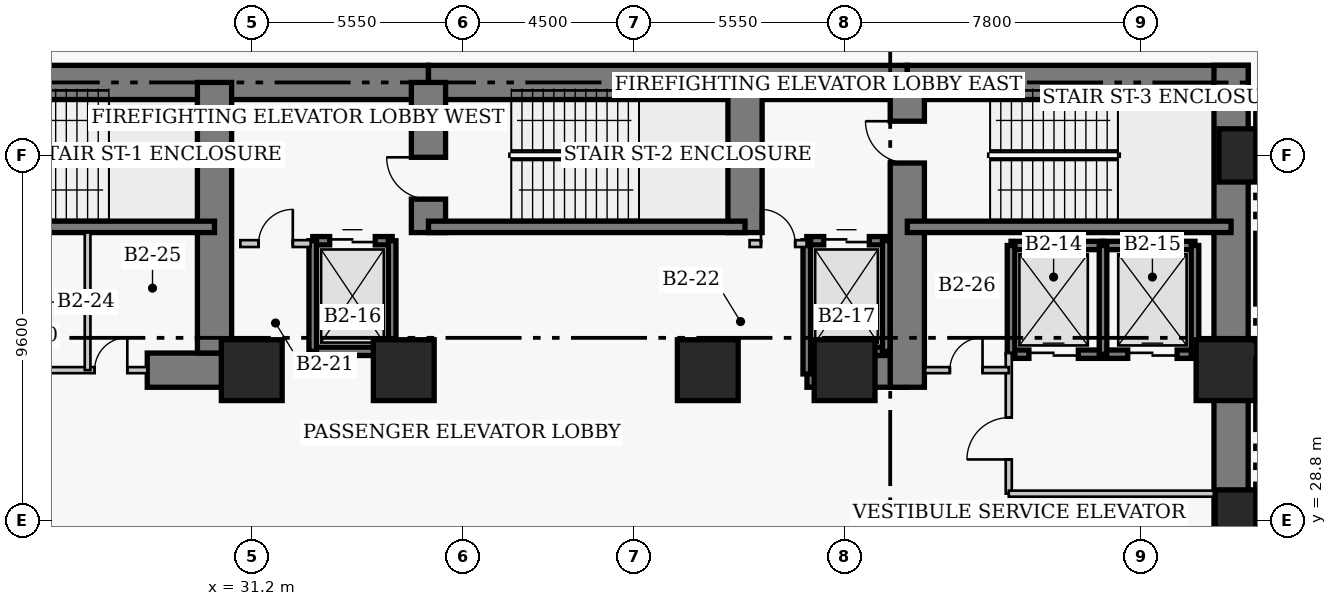
"""IFC4 building model, lengths in metres.
Left out: names, types, materials, properties, quantities, classifications, styles, units other than length and angle.
Written with IfcOpenShell. Run it as: python <this file> out.ifc"""

import sys

from ifc_helpers import new_model, si_unit, direction, frame, frame_2d, origin, origin_2d, place, context, subcontext, project, spatial, rectangle, extrude, element, fill, save


model = new_model("IFC4")
c1 = context("Model", 3, precision=1e-05, world=origin(), true_north=direction((0.0, 1.0)))
c2 = subcontext(c1, "Body", "Model", "MODEL_VIEW")
j1 = project(units=[si_unit("LENGTHUNIT", "METRE"), si_unit("PLANEANGLEUNIT", "RADIAN")], contexts=[c1])
p1 = place(None, origin())
s1 = spatial("IfcSite", under=j1, at=p1, CompositionType="ELEMENT")
p2 = place(p1, origin())
s2 = spatial("IfcBuilding", under=s1, at=p2, CompositionType="ELEMENT")
p3 = place(p2, frame((0.0, 0.0, -9.0)))
s3 = spatial("IfcBuildingStorey", under=s2, at=p3, CompositionType="ELEMENT", Elevation=-9.0)
p4 = place(p3, frame((21.45, 40.32, 0.0), z_axis=(0.0, 0.0, 1.0), x_axis=(1.0, 0.0, 0.0)))
e1 = element("IfcWall", 1, at=p4, inside=s3, PredefinedType="SHEAR", context=c2, shape_type="SweptSolid", body=[
    extrude(rectangle(XDim=14.4, YDim=0.9, at=frame_2d((7.2, 0.0))), origin(), (0.0, 0.0, 1.0), 4.5),
])
p5 = place(p3, frame((35.85, 40.32, 0.0), z_axis=(0.0, 0.0, 1.0), x_axis=(1.0, 0.0, 0.0)))
e2 = element("IfcWall", 2, at=p5, inside=s3, PredefinedType="SHEAR", context=c2, shape_type="SweptSolid", body=[
    extrude(rectangle(XDim=12.6, YDim=0.9, at=frame_2d((6.3, 0.0))), origin(), (0.0, 0.0, 1.0), 4.5),
])
p6 = place(p3, frame((48.45, 40.32, 0.0), z_axis=(0.0, 0.0, 1.0), x_axis=(1.0, 0.0, 0.0)))
e3 = element("IfcWall", 3, at=p6, inside=s3, PredefinedType="SHEAR", context=c2, shape_type="SweptSolid", body=[
    extrude(rectangle(XDim=8.97, YDim=0.9, at=frame_2d((4.485, 0.0))), origin(), (0.0, 0.0, 1.0), 4.5),
])
p7 = place(p3, frame((56.97, 27.05, 0.0), z_axis=(0.0, 0.0, 1.0), x_axis=(0.0, 1.0, 0.0)))
e4 = element("IfcWall", 4, at=p7, inside=s3, PredefinedType="SHEAR", context=c2, shape_type="SweptSolid", body=[
    extrude(rectangle(XDim=13.72, YDim=0.9, at=frame_2d((6.86, 0.0))), origin(), (0.0, 0.0, 1.0), 4.5),
])
p8 = place(p3, frame((28.45, 32.75, 0.0), z_axis=(0.0, 0.0, 1.0), x_axis=(1.0, 0.0, 0.0)))
e5 = element("IfcWall", 5, at=p8, inside=s3, PredefinedType="SHEAR", context=c2, shape_type="SweptSolid", body=[
    extrude(rectangle(XDim=2.4, YDim=0.9, at=frame_2d((1.2, 0.0))), origin(), (0.0, 0.0, 1.0), 4.5),
])
p9 = place(p3, frame((45.81, 32.75, 0.0), z_axis=(0.0, 0.0, 1.0), x_axis=(1.0, 0.0, 0.0)))
e6 = element("IfcWall", 6, at=p9, inside=s3, PredefinedType="SHEAR", context=c2, shape_type="SweptSolid", body=[
    extrude(rectangle(XDim=2.64, YDim=0.9, at=frame_2d((1.32, 0.0))), origin(), (0.0, 0.0, 1.0), 4.5),
])
p10 = place(p3, frame((30.22, 33.2, 0.0), z_axis=(0.0, 0.0, 1.0), x_axis=(0.0, 1.0, 0.0)))
e7 = element("IfcWall", 7, at=p10, inside=s3, PredefinedType="SHEAR", context=c2, shape_type="SweptSolid", body=[
    extrude(rectangle(XDim=7.12, YDim=0.9, at=frame_2d((3.56, 0.0))), origin(), (0.0, 0.0, 1.0), 4.5),
])
p11 = place(p3, frame((35.85, 36.37, 0.0), z_axis=(0.0, 0.0, 1.0), x_axis=(0.0, 1.0, 0.0)))
e8 = element("IfcWall", 8, at=p11, inside=s3, PredefinedType="SHEAR", context=c2, shape_type="SweptSolid", body=[
    extrude(rectangle(XDim=3.95, YDim=0.9, at=frame_2d((1.975, 0.0))), origin(), (0.0, 0.0, 1.0), 4.5),
])
p12 = place(p11, frame((0.88, 0.0, 0.0)))
e9 = element("IfcOpeningElement", 9, at=p12, cuts=e8, PredefinedType="OPENING", context=c2, shape_type="SweptSolid", body=[
    extrude(rectangle(XDim=1.1, YDim=2.15, at=frame_2d((0.55, 1.075))), frame((0.0, 0.46, 0.0), z_axis=(0.0, -1.0, 0.0), x_axis=(1.0, 0.0, 0.0)), (0.0, 0.0, 1.0), 0.92),
])
p13 = place(p3, frame((44.18, 36.37, 0.0), z_axis=(0.0, 0.0, 1.0), x_axis=(0.0, 1.0, 0.0)))
e10 = element("IfcWall", 10, at=p13, inside=s3, PredefinedType="SHEAR", context=c2, shape_type="SweptSolid", body=[
    extrude(rectangle(XDim=3.95, YDim=0.9, at=frame_2d((1.975, 0.0))), origin(), (0.0, 0.0, 1.0), 4.5),
])
p14 = place(p3, frame((48.45, 32.3, 0.0), z_axis=(0.0, 0.0, 1.0), x_axis=(0.0, 1.0, 0.0)))
e11 = element("IfcWall", 11, at=p14, inside=s3, PredefinedType="SHEAR", context=c2, shape_type="SweptSolid", body=[
    extrude(rectangle(XDim=8.02, YDim=0.9, at=frame_2d((4.01, 0.0))), origin(), (0.0, 0.0, 1.0), 4.5),
])
p15 = place(p14, frame((5.9, 0.0, 0.0)))
e12 = element("IfcOpeningElement", 12, at=p15, cuts=e11, PredefinedType="OPENING", context=c2, shape_type="SweptSolid", body=[
    extrude(rectangle(XDim=1.1, YDim=2.15, at=frame_2d((0.55, 1.075))), frame((0.0, 0.46, 0.0), z_axis=(0.0, -1.0, 0.0), x_axis=(1.0, 0.0, 0.0)), (0.0, 0.0, 1.0), 0.92),
])
p16 = place(p3, frame((21.9, 36.52, 0.0), z_axis=(0.0, 0.0, 1.0), x_axis=(1.0, 0.0, 0.0)))
e13 = element("IfcWall", 13, at=p16, inside=s3, PredefinedType="SHEAR", context=c2, shape_type="SweptSolid", body=[
    extrude(rectangle(XDim=8.32, YDim=0.3, at=frame_2d((4.16, 0.0))), origin(), (0.0, 0.0, 1.0), 4.5),
])
p17 = place(p16, frame((0.9, 0.0, 0.0)))
e14 = element("IfcOpeningElement", 14, at=p17, cuts=e13, PredefinedType="OPENING", context=c2, shape_type="SweptSolid", body=[
    extrude(rectangle(XDim=1.1, YDim=2.15, at=frame_2d((0.55, 1.075))), frame((0.0, 0.16, 0.0), z_axis=(0.0, -1.0, 0.0), x_axis=(1.0, 0.0, 0.0)), (0.0, 0.0, 1.0), 0.32),
])
p18 = place(p3, frame((35.85, 36.52, 0.0), z_axis=(0.0, 0.0, 1.0), x_axis=(1.0, 0.0, 0.0)))
e15 = element("IfcWall", 15, at=p18, inside=s3, PredefinedType="SHEAR", context=c2, shape_type="SweptSolid", body=[
    extrude(rectangle(XDim=8.33, YDim=0.3, at=frame_2d((4.165, 0.0))), origin(), (0.0, 0.0, 1.0), 4.5),
])
p19 = place(p3, frame((48.45, 36.52, 0.0), z_axis=(0.0, 0.0, 1.0), x_axis=(1.0, 0.0, 0.0)))
e16 = element("IfcWall", 16, at=p19, inside=s3, PredefinedType="SHEAR", context=c2, shape_type="SweptSolid", body=[
    extrude(rectangle(XDim=8.52, YDim=0.3, at=frame_2d((4.26, 0.0))), origin(), (0.0, 0.0, 1.0), 4.5),
])
p20 = place(p3, frame((57.35, 28.8, 0.0), z_axis=(0.0, 0.0, 1.0), x_axis=(1.0, 0.0, 0.0)))
e17 = element("IfcColumn", 17, at=p20, inside=s3, PredefinedType="COLUMN", context=c2, shape_type="SweptSolid", body=[
    extrude(rectangle(XDim=1.6, YDim=1.6, at=origin_2d()), origin(), (0.0, 0.0, 1.0), 4.5),
])
p21 = place(p3, frame((57.35, 38.4, 0.0), z_axis=(0.0, 0.0, 1.0), x_axis=(1.0, 0.0, 0.0)))
e18 = element("IfcColumn", 18, at=p21, inside=s3, PredefinedType="COLUMN", context=c2, shape_type="SweptSolid", body=[
    extrude(rectangle(XDim=1.4, YDim=1.4, at=origin_2d()), origin(), (0.0, 0.0, 1.0), 4.5),
])
for number, where, z_axis, x_axis in (
    (19, (31.2, 32.75, 0.0), (0.0, 0.0, 1.0), (1.0, 0.0, 0.0)),
    (20, (35.2, 32.75, 0.0), (0.0, 0.0, 1.0), (1.0, 0.0, 0.0)),
    (21, (43.2, 32.75, 0.0), (0.0, 0.0, 1.0), (1.0, 0.0, 0.0)),
    (22, (46.8, 32.75, 0.0), (0.0, 0.0, 1.0), (1.0, 0.0, 0.0)),
    (23, (56.85, 32.75, 0.0), (0.0, 0.0, 1.0), (1.0, 0.0, 0.0)),
):
    element("IfcColumn", number, at=place(p3, frame(where, z_axis=z_axis, x_axis=x_axis)), inside=s3, PredefinedType="COLUMN", context=c2, shape_type="SweptSolid", body=[
        extrude(rectangle(XDim=1.6, YDim=1.6, at=origin_2d()), origin(), (0.0, 0.0, 1.0), 4.5),
    ])
p22 = place(p3, frame((51.18, 36.03, 0.0), z_axis=(0.0, 0.0, 1.0), x_axis=(1.0, 0.0, 0.0)))
e24 = element("IfcWall", 24, at=p22, inside=s3, PredefinedType="SHEAR", context=c2, shape_type="SweptSolid", body=[
    extrude(rectangle(XDim=2.42, YDim=0.22, at=frame_2d((1.21, 0.0))), origin(), (0.0, 0.0, 1.0), 4.5),
])
p23 = place(p3, frame((51.18, 33.17, 0.0), z_axis=(0.0, 0.0, 1.0), x_axis=(1.0, 0.0, 0.0)))
e25 = element("IfcWall", 25, at=p23, inside=s3, PredefinedType="SHEAR", context=c2, shape_type="SweptSolid", body=[
    extrude(rectangle(XDim=2.42, YDim=0.22, at=frame_2d((1.21, 0.0))), origin(), (0.0, 0.0, 1.0), 4.5),
])
p24 = place(p23, frame((0.47, 0.0, 0.0)))
e26 = element("IfcOpeningElement", 26, at=p24, cuts=e25, PredefinedType="OPENING", context=c2, shape_type="SweptSolid", body=[
    extrude(rectangle(XDim=1.3, YDim=2.15, at=frame_2d((0.65, 1.075))), frame((0.0, 0.12, 0.0), z_axis=(0.0, -1.0, 0.0), x_axis=(1.0, 0.0, 0.0)), (0.0, 0.0, 1.0), 0.24),
])
p25 = place(p3, frame((51.18, 33.17, 0.0), z_axis=(0.0, 0.0, 1.0), x_axis=(0.0, 1.0, 0.0)))
e27 = element("IfcWall", 27, at=p25, inside=s3, PredefinedType="SHEAR", context=c2, shape_type="SweptSolid", body=[
    extrude(rectangle(XDim=2.86, YDim=0.2, at=frame_2d((1.43, 0.0))), origin(), (0.0, 0.0, 1.0), 4.5),
])
p26 = place(p3, frame((53.6, 36.03, 0.0), z_axis=(0.0, 0.0, 1.0), x_axis=(1.0, 0.0, 0.0)))
e28 = element("IfcWall", 28, at=p26, inside=s3, PredefinedType="SHEAR", context=c2, shape_type="SweptSolid", body=[
    extrude(rectangle(XDim=2.42, YDim=0.22, at=frame_2d((1.21, 0.0))), origin(), (0.0, 0.0, 1.0), 4.5),
])
p27 = place(p3, frame((53.6, 33.17, 0.0), z_axis=(0.0, 0.0, 1.0), x_axis=(1.0, 0.0, 0.0)))
e29 = element("IfcWall", 29, at=p27, inside=s3, PredefinedType="SHEAR", context=c2, shape_type="SweptSolid", body=[
    extrude(rectangle(XDim=2.42, YDim=0.22, at=frame_2d((1.21, 0.0))), origin(), (0.0, 0.0, 1.0), 4.5),
])
p28 = place(p27, frame((0.65, 0.0, 0.0)))
e30 = element("IfcOpeningElement", 30, at=p28, cuts=e29, PredefinedType="OPENING", context=c2, shape_type="SweptSolid", body=[
    extrude(rectangle(XDim=1.3, YDim=2.15, at=frame_2d((0.65, 1.075))), frame((0.0, 0.12, 0.0), z_axis=(0.0, -1.0, 0.0), x_axis=(1.0, 0.0, 0.0)), (0.0, 0.0, 1.0), 0.24),
])
for number, where, z_axis, x_axis in (
    (31, (53.6, 33.17, 0.0), (0.0, 0.0, 1.0), (0.0, 1.0, 0.0)),
    (32, (56.02, 33.17, 0.0), (0.0, 0.0, 1.0), (0.0, 1.0, 0.0)),
):
    element("IfcWall", number, at=place(p3, frame(where, z_axis=z_axis, x_axis=x_axis)), inside=s3, PredefinedType="SHEAR", context=c2, shape_type="SweptSolid", body=[
        extrude(rectangle(XDim=2.86, YDim=0.2, at=frame_2d((1.43, 0.0))), origin(), (0.0, 0.0, 1.0), 4.5),
    ])
p29 = place(p3, frame((32.805, 36.155, 0.0), z_axis=(0.0, 0.0, 1.0), x_axis=(1.0, 0.0, 0.0)))
e33 = element("IfcWall", 33, at=p29, inside=s3, PredefinedType="SHEAR", context=c2, shape_type="SweptSolid", body=[
    extrude(rectangle(XDim=2.09, YDim=0.22, at=frame_2d((1.045, 0.0))), origin(), (0.0, 0.0, 1.0), 4.5),
])
p30 = place(p29, frame((0.445, 0.0, 0.0)))
e34 = element("IfcOpeningElement", 34, at=p30, cuts=e33, PredefinedType="OPENING", context=c2, shape_type="SweptSolid", body=[
    extrude(rectangle(XDim=1.2, YDim=2.15, at=frame_2d((0.6, 1.075))), frame((0.0, 0.12, 0.0), z_axis=(0.0, -1.0, 0.0), x_axis=(1.0, 0.0, 0.0)), (0.0, 0.0, 1.0), 0.24),
])
p31 = place(p3, frame((32.805, 33.245, 0.0), z_axis=(0.0, 0.0, 1.0), x_axis=(1.0, 0.0, 0.0)))
e35 = element("IfcWall", 35, at=p31, inside=s3, PredefinedType="SHEAR", context=c2, shape_type="SweptSolid", body=[
    extrude(rectangle(XDim=2.09, YDim=0.22, at=frame_2d((1.045, 0.0))), origin(), (0.0, 0.0, 1.0), 4.5),
])
for number, where, z_axis, x_axis in (
    (36, (32.805, 33.245, 0.0), (0.0, 0.0, 1.0), (0.0, 1.0, 0.0)),
    (37, (34.895, 33.245, 0.0), (0.0, 0.0, 1.0), (0.0, 1.0, 0.0)),
):
    element("IfcWall", number, at=place(p3, frame(where, z_axis=z_axis, x_axis=x_axis)), inside=s3, PredefinedType="SHEAR", context=c2, shape_type="SweptSolid", body=[
        extrude(rectangle(XDim=2.91, YDim=0.2, at=frame_2d((1.455, 0.0))), origin(), (0.0, 0.0, 1.0), 4.5),
    ])
p32 = place(p3, frame((45.805, 36.155, 0.0), z_axis=(0.0, 0.0, 1.0), x_axis=(1.0, 0.0, 0.0)))
e38 = element("IfcWall", 38, at=p32, inside=s3, PredefinedType="SHEAR", context=c2, shape_type="SweptSolid", body=[
    extrude(rectangle(XDim=2.09, YDim=0.22, at=frame_2d((1.045, 0.0))), origin(), (0.0, 0.0, 1.0), 4.5),
])
p33 = place(p32, frame((0.445, 0.0, 0.0)))
e39 = element("IfcOpeningElement", 39, at=p33, cuts=e38, PredefinedType="OPENING", context=c2, shape_type="SweptSolid", body=[
    extrude(rectangle(XDim=1.2, YDim=2.15, at=frame_2d((0.6, 1.075))), frame((0.0, 0.12, 0.0), z_axis=(0.0, -1.0, 0.0), x_axis=(1.0, 0.0, 0.0)), (0.0, 0.0, 1.0), 0.24),
])
p34 = place(p3, frame((45.805, 33.245, 0.0), z_axis=(0.0, 0.0, 1.0), x_axis=(1.0, 0.0, 0.0)))
e40 = element("IfcWall", 40, at=p34, inside=s3, PredefinedType="SHEAR", context=c2, shape_type="SweptSolid", body=[
    extrude(rectangle(XDim=2.09, YDim=0.22, at=frame_2d((1.045, 0.0))), origin(), (0.0, 0.0, 1.0), 4.5),
])
p35 = place(p3, frame((45.805, 32.65, 0.0), z_axis=(0.0, 0.0, 1.0), x_axis=(0.0, 1.0, 0.0)))
e41 = element("IfcWall", 41, at=p35, inside=s3, PredefinedType="SHEAR", context=c2, shape_type="SweptSolid", body=[
    extrude(rectangle(XDim=3.505, YDim=0.2, at=frame_2d((1.752, 0.0))), origin(), (0.0, 0.0, 1.0), 4.5),
])
p36 = place(p3, frame((47.895, 33.245, 0.0), z_axis=(0.0, 0.0, 1.0), x_axis=(0.0, 1.0, 0.0)))
e42 = element("IfcWall", 42, at=p36, inside=s3, PredefinedType="SHEAR", context=c2, shape_type="SweptSolid", body=[
    extrude(rectangle(XDim=2.91, YDim=0.2, at=frame_2d((1.455, 0.0))), origin(), (0.0, 0.0, 1.0), 4.5),
])
p37 = place(p3, frame((30.9, 36.08, 0.0), z_axis=(0.0, 0.0, 1.0), x_axis=(1.0, 0.0, 0.0)))
e43 = element("IfcWall", 43, at=p37, inside=s3, PredefinedType="PARTITIONING", context=c2, shape_type="SweptSolid", body=[
    extrude(rectangle(XDim=1.85, YDim=0.18, at=frame_2d((0.925, 0.0))), origin(), (0.0, 0.0, 1.0), 4.18),
])
p38 = place(p37, frame((0.48, 0.0, 0.0)))
e44 = element("IfcOpeningElement", 44, at=p38, cuts=e43, PredefinedType="OPENING", context=c2, shape_type="SweptSolid", body=[
    extrude(rectangle(XDim=0.9, YDim=2.15, at=frame_2d((0.45, 1.075))), frame((0.0, 0.1, 0.0), z_axis=(0.0, -1.0, 0.0), x_axis=(1.0, 0.0, 0.0)), (0.0, 0.0, 1.0), 0.2),
])
p39 = place(p3, frame((44.3, 36.08, 0.0), z_axis=(0.0, 0.0, 1.0), x_axis=(1.0, 0.0, 0.0)))
e45 = element("IfcWall", 45, at=p39, inside=s3, PredefinedType="PARTITIONING", context=c2, shape_type="SweptSolid", body=[
    extrude(rectangle(XDim=1.5, YDim=0.18, at=frame_2d((0.75, 0.0))), origin(), (0.0, 0.0, 1.0), 4.18),
])
p40 = place(p39, frame((0.3, 0.0, 0.0)))
e46 = element("IfcOpeningElement", 46, at=p40, cuts=e45, PredefinedType="OPENING", context=c2, shape_type="SweptSolid", body=[
    extrude(rectangle(XDim=0.9, YDim=2.15, at=frame_2d((0.45, 1.075))), frame((0.0, 0.1, 0.0), z_axis=(0.0, -1.0, 0.0), x_axis=(1.0, 0.0, 0.0)), (0.0, 0.0, 1.0), 0.2),
])
p41 = place(p3, frame((51.12, 29.5, 0.0), z_axis=(0.0, 0.0, 1.0), x_axis=(0.0, 1.0, 0.0)))
e47 = element("IfcWall", 47, at=p41, inside=s3, PredefinedType="PARTITIONING", context=c2, shape_type="SweptSolid", body=[
    extrude(rectangle(XDim=3.7, YDim=0.16, at=frame_2d((1.85, 0.0))), origin(), (0.0, 0.0, 1.0), 4.18),
])
p42 = place(p41, frame((0.9, 0.0, 0.0)))
e48 = element("IfcOpeningElement", 48, at=p42, cuts=e47, PredefinedType="OPENING", context=c2, shape_type="SweptSolid", body=[
    extrude(rectangle(XDim=1.1, YDim=2.15, at=frame_2d((0.55, 1.075))), frame((0.0, 0.09, 0.0), z_axis=(0.0, -1.0, 0.0), x_axis=(1.0, 0.0, 0.0)), (0.0, 0.0, 1.0), 0.18),
])
p43 = place(p3, frame((51.12, 29.5, 0.0), z_axis=(0.0, 0.0, 1.0), x_axis=(1.0, 0.0, 0.0)))
e49 = element("IfcWall", 49, at=p43, inside=s3, PredefinedType="PARTITIONING", context=c2, shape_type="SweptSolid", body=[
    extrude(rectangle(XDim=5.63, YDim=0.16, at=frame_2d((2.815, 0.0))), origin(), (0.0, 0.0, 1.0), 4.18),
])
p44 = place(p3, frame((24.48, 32.75, 0.0), z_axis=(0.0, 0.0, 1.0), x_axis=(1.0, 0.0, 0.0)))
e50 = element("IfcWall", 50, at=p44, inside=s3, PredefinedType="PARTITIONING", context=c2, shape_type="SweptSolid", body=[
    extrude(rectangle(XDim=3.97, YDim=0.16, at=frame_2d((1.985, 0.0))), origin(), (0.0, 0.0, 1.0), 4.18),
])
p45 = place(p44, frame((2.585, 0.0, 0.0)))
e51 = element("IfcOpeningElement", 51, at=p45, cuts=e50, PredefinedType="OPENING", context=c2, shape_type="SweptSolid", body=[
    extrude(rectangle(XDim=0.86, YDim=2.05, at=frame_2d((0.43, 1.025))), frame((0.0, 0.09, 0.0), z_axis=(0.0, -1.0, 0.0), x_axis=(1.0, 0.0, 0.0)), (0.0, 0.0, 1.0), 0.18),
])
p46 = place(p3, frame((48.92, 32.75, 0.0), z_axis=(0.0, 0.0, 1.0), x_axis=(1.0, 0.0, 0.0)))
e52 = element("IfcWall", 52, at=p46, inside=s3, PredefinedType="PARTITIONING", context=c2, shape_type="SweptSolid", body=[
    extrude(rectangle(XDim=2.2, YDim=0.16, at=frame_2d((1.1, 0.0))), origin(), (0.0, 0.0, 1.0), 4.18),
])
p47 = place(p46, frame((0.65, 0.0, 0.0)))
e53 = element("IfcOpeningElement", 53, at=p47, cuts=e52, PredefinedType="OPENING", context=c2, shape_type="SweptSolid", body=[
    extrude(rectangle(XDim=0.86, YDim=2.05, at=frame_2d((0.43, 1.025))), frame((0.0, 0.09, 0.0), z_axis=(0.0, -1.0, 0.0), x_axis=(1.0, 0.0, 0.0)), (0.0, 0.0, 1.0), 0.18),
])
p48 = place(p3, frame((26.88, 32.75, 0.0), z_axis=(0.0, 0.0, 1.0), x_axis=(0.0, 1.0, 0.0)))
e54 = element("IfcWall", 54, at=p48, inside=s3, PredefinedType="PARTITIONING", context=c2, shape_type="SweptSolid", body=[
    extrude(rectangle(XDim=3.62, YDim=0.15, at=frame_2d((1.81, 0.0))), origin(), (0.0, 0.0, 1.0), 4.18),
])
p49 = place(p24, origin())
e55 = element("IfcDoor", 55, at=p49, inside=s3, OperationType="DOUBLE_DOOR_SLIDING", PredefinedType="DOOR", context=c2, shape_type="SweptSolid", body=[
    extrude(rectangle(XDim=1.3, YDim=2.15, at=frame_2d((0.65, 1.075))), frame((0.0, 0.025, 0.0), z_axis=(0.0, -1.0, 0.0), x_axis=(1.0, 0.0, 0.0)), (0.0, 0.0, 1.0), 0.05),
])
fill(e26, e55)
p50 = place(p28, origin())
e56 = element("IfcDoor", 56, at=p50, inside=s3, OperationType="DOUBLE_DOOR_SLIDING", PredefinedType="DOOR", context=c2, shape_type="SweptSolid", body=[
    extrude(rectangle(XDim=1.3, YDim=2.15, at=frame_2d((0.65, 1.075))), frame((0.0, 0.025, 0.0), z_axis=(0.0, -1.0, 0.0), x_axis=(1.0, 0.0, 0.0)), (0.0, 0.0, 1.0), 0.05),
])
fill(e30, e56)
p51 = place(p30, origin())
e57 = element("IfcDoor", 57, at=p51, inside=s3, OperationType="DOUBLE_DOOR_SLIDING", PredefinedType="DOOR", context=c2, shape_type="SweptSolid", body=[
    extrude(rectangle(XDim=1.2, YDim=2.15, at=frame_2d((0.6, 1.075))), frame((0.0, 0.025, 0.0), z_axis=(0.0, -1.0, 0.0), x_axis=(1.0, 0.0, 0.0)), (0.0, 0.0, 1.0), 0.05),
])
fill(e34, e57)
p52 = place(p33, origin())
e58 = element("IfcDoor", 58, at=p52, inside=s3, OperationType="DOUBLE_DOOR_SLIDING", PredefinedType="DOOR", context=c2, shape_type="SweptSolid", body=[
    extrude(rectangle(XDim=1.2, YDim=2.15, at=frame_2d((0.6, 1.075))), frame((0.0, 0.025, 0.0), z_axis=(0.0, -1.0, 0.0), x_axis=(1.0, 0.0, 0.0)), (0.0, 0.0, 1.0), 0.05),
])
fill(e39, e58)
p53 = place(p38, origin())
e59 = element("IfcDoor", 59, at=p53, inside=s3, OperationType="SINGLE_SWING_RIGHT", PredefinedType="DOOR", context=c2, shape_type="SweptSolid", body=[
    extrude(rectangle(XDim=0.9, YDim=2.15, at=frame_2d((0.45, 1.075))), frame((0.0, 0.025, 0.0), z_axis=(0.0, -1.0, 0.0), x_axis=(1.0, 0.0, 0.0)), (0.0, 0.0, 1.0), 0.05),
])
fill(e44, e59)
p54 = place(p40, origin())
e60 = element("IfcDoor", 60, at=p54, inside=s3, OperationType="SINGLE_SWING_LEFT", PredefinedType="DOOR", context=c2, shape_type="SweptSolid", body=[
    extrude(rectangle(XDim=0.9, YDim=2.15, at=frame_2d((0.45, 1.075))), frame((0.0, 0.025, 0.0), z_axis=(0.0, -1.0, 0.0), x_axis=(1.0, 0.0, 0.0)), (0.0, 0.0, 1.0), 0.05),
])
fill(e46, e60)
p55 = place(p42, origin())
e61 = element("IfcDoor", 61, at=p55, inside=s3, OperationType="SINGLE_SWING_LEFT", PredefinedType="DOOR", context=c2, shape_type="SweptSolid", body=[
    extrude(rectangle(XDim=1.1, YDim=2.15, at=frame_2d((0.55, 1.075))), frame((0.0, 0.025, 0.0), z_axis=(0.0, -1.0, 0.0), x_axis=(1.0, 0.0, 0.0)), (0.0, 0.0, 1.0), 0.05),
])
fill(e48, e61)
p56 = place(p45, origin())
e62 = element("IfcDoor", 62, at=p56, inside=s3, OperationType="SINGLE_SWING_RIGHT", PredefinedType="DOOR", context=c2, shape_type="SweptSolid", body=[
    extrude(rectangle(XDim=0.86, YDim=2.05, at=frame_2d((0.43, 1.025))), frame((0.0, 0.025, 0.0), z_axis=(0.0, -1.0, 0.0), x_axis=(1.0, 0.0, 0.0)), (0.0, 0.0, 1.0), 0.05),
])
fill(e51, e62)
p57 = place(p47, origin())
e63 = element("IfcDoor", 63, at=p57, inside=s3, OperationType="SINGLE_SWING_RIGHT", PredefinedType="DOOR", context=c2, shape_type="SweptSolid", body=[
    extrude(rectangle(XDim=0.86, YDim=2.05, at=frame_2d((0.43, 1.025))), frame((0.0, 0.025, 0.0), z_axis=(0.0, -1.0, 0.0), x_axis=(1.0, 0.0, 0.0)), (0.0, 0.0, 1.0), 0.05),
])
fill(e53, e63)
p58 = place(p12, origin())
e64 = element("IfcDoor", 64, at=p58, inside=s3, OperationType="SINGLE_SWING_RIGHT", PredefinedType="DOOR", context=c2, shape_type="SweptSolid", body=[
    extrude(rectangle(XDim=1.1, YDim=2.15, at=frame_2d((0.55, 1.075))), frame((0.0, 0.025, 0.0), z_axis=(0.0, -1.0, 0.0), x_axis=(1.0, 0.0, 0.0)), (0.0, 0.0, 1.0), 0.05),
])
fill(e9, e64)
p59 = place(p15, origin())
e65 = element("IfcDoor", 65, at=p59, inside=s3, OperationType="SINGLE_SWING_RIGHT", PredefinedType="DOOR", context=c2, shape_type="SweptSolid", body=[
    extrude(rectangle(XDim=1.1, YDim=2.15, at=frame_2d((0.55, 1.075))), frame((0.0, 0.025, 0.0), z_axis=(0.0, -1.0, 0.0), x_axis=(1.0, 0.0, 0.0)), (0.0, 0.0, 1.0), 0.05),
])
fill(e12, e65)
save(model, sys.argv[1])
